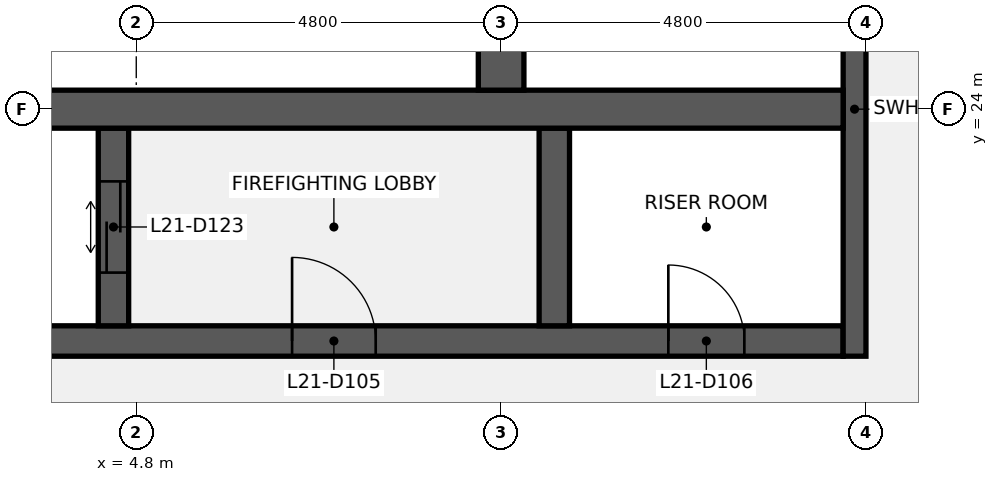
"""IFC4 building model, lengths in metres.
Left out: names, types, materials, properties, quantities, classifications, styles, units other than length and angle.
Written with IfcOpenShell. Run it as: python <this file> out.ifc"""

import sys

from ifc_helpers import new_model, si_unit, direction, frame, frame_2d, origin, place, context, subcontext, project, spatial, rectangle, extrude, element, fill, save


model = new_model("IFC4")
c1 = context("Model", 3, precision=1e-05, world=origin(), true_north=direction((0.0, 1.0)))
c2 = subcontext(c1, "Body", "Model", "MODEL_VIEW")
j1 = project(units=[si_unit("LENGTHUNIT", "METRE"), si_unit("PLANEANGLEUNIT", "RADIAN")], contexts=[c1])
p1 = place(None, origin())
s1 = spatial("IfcSite", under=j1, at=p1, CompositionType="ELEMENT")
p2 = place(p1, origin())
s2 = spatial("IfcBuilding", under=s1, at=p2, CompositionType="ELEMENT")
p3 = place(p2, frame((0.0, 0.0, 104.1)))
s3 = spatial("IfcBuildingStorey", under=s2, at=p3, CompositionType="ELEMENT", Elevation=104.1)
p4 = place(p3, frame((1.0, 20.95, 0.0), z_axis=(0.0, 0.0, 1.0), x_axis=(1.0, 0.0, 0.0)))
e1 = element("IfcWall", 1, at=p4, inside=s3, PredefinedType="SHEAR", context=c2, shape_type="SweptSolid", body=[
    extrude(rectangle(XDim=13.1, YDim=0.4, at=frame_2d((6.55, 0.0))), origin(), (0.0, 0.0, 1.0), 3.84),
])
p5 = place(p4, frame((5.85, 0.0, 0.0)))
e2 = element("IfcOpeningElement", 2, at=p5, cuts=e1, PredefinedType="OPENING", context=c2, shape_type="SweptSolid", body=[
    extrude(rectangle(XDim=1.1, YDim=2.1, at=frame_2d((0.55, 1.05))), frame((0.0, 0.21, 0.0), z_axis=(0.0, -1.0, 0.0), x_axis=(1.0, 0.0, 0.0)), (0.0, 0.0, 1.0), 0.42),
])
p6 = place(p4, frame((10.8, 0.0, 0.0)))
e3 = element("IfcOpeningElement", 3, at=p6, cuts=e1, PredefinedType="OPENING", context=c2, shape_type="SweptSolid", body=[
    extrude(rectangle(XDim=1.0, YDim=2.1, at=frame_2d((0.5, 1.05))), frame((0.0, 0.21, 0.0), z_axis=(0.0, -1.0, 0.0), x_axis=(1.0, 0.0, 0.0)), (0.0, 0.0, 1.0), 0.42),
])
p7 = place(p3, frame((14.25, 20.75, 0.0), z_axis=(0.0, 0.0, 1.0), x_axis=(0.0, 1.0, 0.0)))
e4 = element("IfcWall", 4, at=p7, inside=s3, PredefinedType="SHEAR", context=c2, shape_type="SweptSolid", body=[
    extrude(rectangle(XDim=6.5, YDim=0.3, at=frame_2d((3.25, 0.0))), origin(), (0.0, 0.0, 1.0), 3.84),
])
p8 = place(p3, frame((4.5, 21.15, 0.0), z_axis=(0.0, 0.0, 1.0), x_axis=(0.0, 1.0, 0.0)))
e5 = element("IfcWall", 5, at=p8, inside=s3, PredefinedType="SHEAR", context=c2, shape_type="SweptSolid", body=[
    extrude(rectangle(XDim=2.6, YDim=0.4, at=frame_2d((1.3, 0.0))), origin(), (0.0, 0.0, 1.0), 3.84),
])
p9 = place(p8, frame((0.7, 0.0, 0.0)))
e6 = element("IfcOpeningElement", 6, at=p9, cuts=e5, PredefinedType="OPENING", context=c2, shape_type="SweptSolid", body=[
    extrude(rectangle(XDim=1.2, YDim=2.1, at=frame_2d((0.6, 1.05))), frame((0.0, 0.21, 0.0), z_axis=(0.0, -1.0, 0.0), x_axis=(1.0, 0.0, 0.0)), (0.0, 0.0, 1.0), 0.42),
])
p10 = place(p3, frame((10.3, 21.15, 0.0), z_axis=(0.0, 0.0, 1.0), x_axis=(0.0, 1.0, 0.0)))
e7 = element("IfcWall", 7, at=p10, inside=s3, PredefinedType="SHEAR", context=c2, shape_type="SweptSolid", body=[
    extrude(rectangle(XDim=2.6, YDim=0.4, at=frame_2d((1.3, 0.0))), origin(), (0.0, 0.0, 1.0), 3.84),
])
p11 = place(p3, frame((1.0, 24.0, 0.0), z_axis=(0.0, 0.0, 1.0), x_axis=(1.0, 0.0, 0.0)))
e8 = element("IfcWall", 8, at=p11, inside=s3, PredefinedType="SHEAR", context=c2, shape_type="SweptSolid", body=[
    extrude(rectangle(XDim=13.1, YDim=0.5, at=frame_2d((6.55, 0.0))), origin(), (0.0, 0.0, 1.0), 3.84),
])
p12 = place(p3, frame((9.6, 24.25, 0.0), z_axis=(0.0, 0.0, 1.0), x_axis=(0.0, 1.0, 0.0)))
e9 = element("IfcWall", 9, at=p12, inside=s3, PredefinedType="SHEAR", context=c2, shape_type="SweptSolid", body=[
    extrude(rectangle(XDim=2.6, YDim=0.6, at=frame_2d((1.3, 0.0))), origin(), (0.0, 0.0, 1.0), 3.84),
])
p13 = place(p5, origin())
e10 = element("IfcDoor", 10, at=p13, inside=s3, OperationType="SINGLE_SWING_LEFT", PredefinedType="DOOR", context=c2, shape_type="SweptSolid", body=[
    extrude(rectangle(XDim=1.1, YDim=2.1, at=frame_2d((0.55, 1.05))), frame((0.0, 0.025, 0.0), z_axis=(0.0, -1.0, 0.0), x_axis=(1.0, 0.0, 0.0)), (0.0, 0.0, 1.0), 0.05),
])
fill(e2, e10)
p14 = place(p6, origin())
e11 = element("IfcDoor", 11, at=p14, inside=s3, OperationType="SINGLE_SWING_LEFT", PredefinedType="DOOR", context=c2, shape_type="SweptSolid", body=[
    extrude(rectangle(XDim=1.0, YDim=2.1, at=frame_2d((0.5, 1.05))), frame((0.0, 0.025, 0.0), z_axis=(0.0, -1.0, 0.0), x_axis=(1.0, 0.0, 0.0)), (0.0, 0.0, 1.0), 0.05),
])
fill(e3, e11)
p15 = place(p9, origin())
e12 = element("IfcDoor", 12, at=p15, inside=s3, OperationType="DOUBLE_DOOR_SLIDING", PredefinedType="DOOR", context=c2, shape_type="SweptSolid", body=[
    extrude(rectangle(XDim=1.2, YDim=2.1, at=frame_2d((0.6, 1.05))), frame((0.0, 0.025, 0.0), z_axis=(0.0, -1.0, 0.0), x_axis=(1.0, 0.0, 0.0)), (0.0, 0.0, 1.0), 0.05),
])
fill(e6, e12)
save(model, sys.argv[1])
